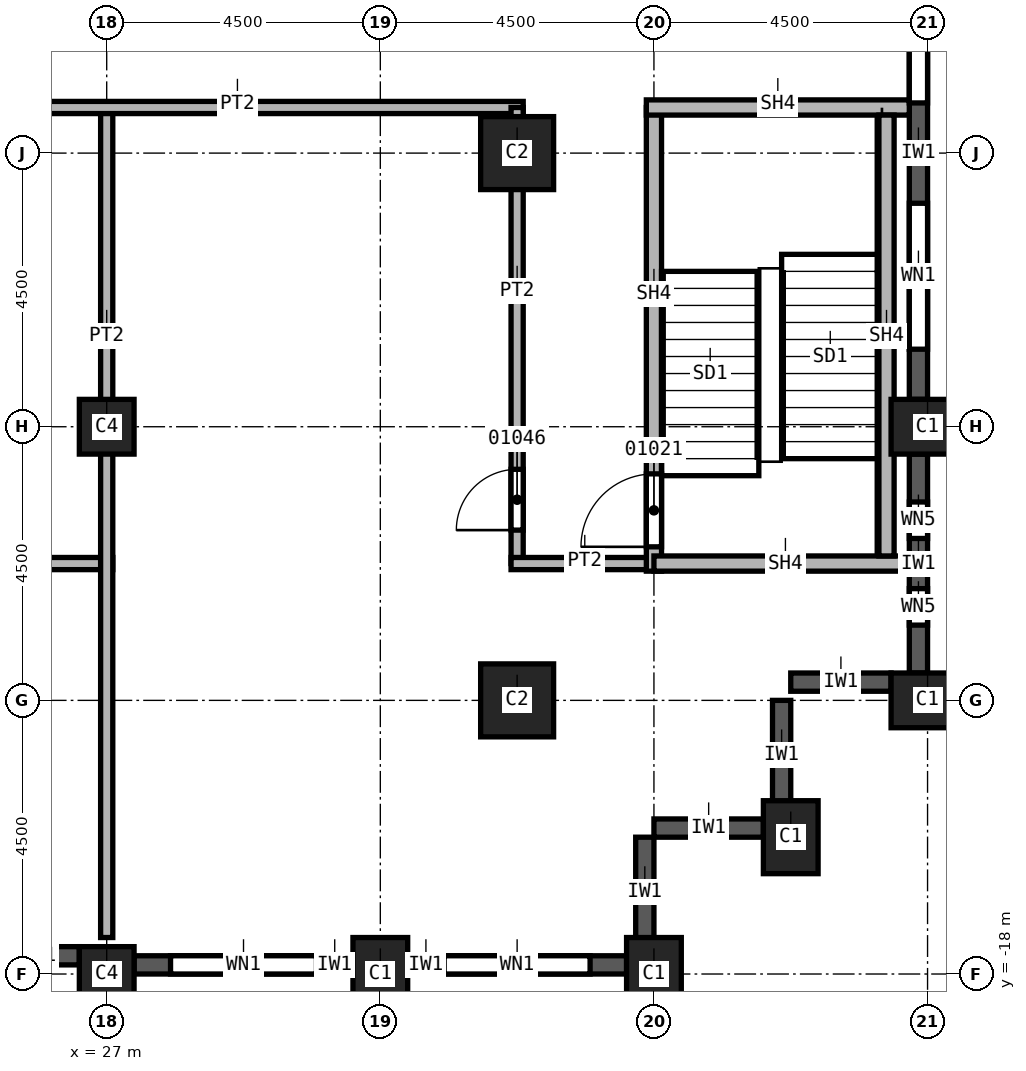
"""IFC4 building model, lengths in metres.
Left out: names, types, materials, properties, quantities, classifications, styles, units other than length and angle.
Written with IfcOpenShell. Run it as: python <this file> out.ifc"""

import sys

from ifc_helpers import new_model, si_unit, direction, frame, frame_2d, origin, origin_2d, place, context, subcontext, project, spatial, rectangle, extrude, element, fill, save


model = new_model("IFC4")
c1 = context("Model", 3, precision=1e-05, world=origin(), true_north=direction((0.0, 1.0)))
c2 = subcontext(c1, "Body", "Model", "MODEL_VIEW")
j1 = project(units=[si_unit("LENGTHUNIT", "METRE"), si_unit("PLANEANGLEUNIT", "RADIAN")], contexts=[c1])
p1 = place(None, origin())
s1 = spatial("IfcSite", under=j1, at=p1, CompositionType="ELEMENT")
p2 = place(p1, origin())
s2 = spatial("IfcBuilding", under=s1, at=p2, CompositionType="ELEMENT")
p3 = place(p2, frame((0.0, 0.0, 68.0)))
s3 = spatial("IfcBuildingStorey", under=s2, at=p3, CompositionType="ELEMENT", Elevation=68.0)
for number, where, z_axis, x_axis in (
    (1, (40.5, -9.0, 0.0), (0.0, 0.0, 1.0), (0.0, 1.0, 0.0)),
    (2, (40.5, -13.5, 0.0), (0.0, 0.0, 1.0), (0.0, 1.0, 0.0)),
    (3, (38.25, -15.75, 0.0), (0.0, 0.0, 1.0), (1.0, 0.0, 0.0)),
    (4, (31.5, -18.0, 0.0), (0.0, 0.0, 1.0), (1.0, 0.0, 0.0)),
    (5, (36.0, -18.0, 0.0), (0.0, 0.0, 1.0), (1.0, 0.0, 0.0)),
):
    element("IfcColumn", number, at=place(p3, frame(where, z_axis=z_axis, x_axis=x_axis)), inside=s3, PredefinedType="COLUMN", context=c2, shape_type="SweptSolid", body=[
        extrude(rectangle(XDim=0.9, YDim=1.2, at=origin_2d()), origin(), (0.0, 0.0, 1.0), 3.7),
    ])
for number, where, z_axis, x_axis in (
    (6, (33.75, -4.5, 0.0), (0.0, 0.0, 1.0), (1.0, 0.0, 0.0)),
    (7, (33.75, -13.5, 0.0), (0.0, 0.0, 1.0), (1.0, 0.0, 0.0)),
):
    element("IfcColumn", number, at=place(p3, frame(where, z_axis=z_axis, x_axis=x_axis)), inside=s3, PredefinedType="COLUMN", context=c2, shape_type="SweptSolid", body=[
        extrude(rectangle(XDim=1.2, YDim=1.2, at=origin_2d()), origin(), (0.0, 0.0, 1.0), 3.7),
    ])
for number, where, z_axis, x_axis in (
    (8, (27.0, -9.0, 0.0), (0.0, 0.0, 1.0), (1.0, 0.0, 0.0)),
    (9, (27.0, -18.0, 0.0), (0.0, 0.0, 1.0), (1.0, 0.0, 0.0)),
):
    element("IfcColumn", number, at=place(p3, frame(where, z_axis=z_axis, x_axis=x_axis)), inside=s3, PredefinedType="COLUMN", context=c2, shape_type="SweptSolid", body=[
        extrude(rectangle(XDim=0.9, YDim=0.9, at=origin_2d()), origin(), (0.0, 0.0, 1.0), 3.7),
    ])
for number, where, z_axis, x_axis in (
    (10, (35.85, -17.55, 0.0), (0.0, 0.0, 1.0), (0.0, 1.0, 0.0)),
    (11, (37.8, -15.6, 0.0), (0.0, 0.0, 1.0), (-1.0, 0.0, 0.0)),
    (12, (38.1, -15.3, 0.0), (0.0, 0.0, 1.0), (0.0, 1.0, 0.0)),
):
    element("IfcWall", number, at=place(p3, frame(where, z_axis=z_axis, x_axis=x_axis)), inside=s3, PredefinedType="SOLIDWALL", context=c2, shape_type="SweptSolid", body=[
        extrude(rectangle(XDim=1.8, YDim=0.3, at=frame_2d((0.9, 0.0))), origin(), (0.0, 0.0, 1.0), 3.1),
    ])
p4 = place(p3, frame((39.9, -13.2, 0.0), z_axis=(0.0, 0.0, 1.0), x_axis=(-1.0, 0.0, 0.0)))
e13 = element("IfcWall", 13, at=p4, inside=s3, PredefinedType="SOLIDWALL", context=c2, shape_type="SweptSolid", body=[
    extrude(rectangle(XDim=1.65, YDim=0.3, at=frame_2d((0.825, 0.0))), origin(), (0.0, 0.0, 1.0), 3.1),
])
p5 = place(p3, frame((25.2, -17.7, 0.0), z_axis=(0.0, 0.0, 1.0), x_axis=(1.0, 0.0, 0.0)))
e14 = element("IfcWall", 14, at=p5, inside=s3, PredefinedType="SOLIDWALL", context=c2, shape_type="SweptSolid", body=[
    extrude(rectangle(XDim=1.35, YDim=0.3, at=frame_2d((0.675, 0.0))), origin(), (0.0, 0.0, 1.0), 3.1),
])
p6 = place(p3, frame((27.45, -17.85, 0.0), z_axis=(0.0, 0.0, 1.0), x_axis=(1.0, 0.0, 0.0)))
e15 = element("IfcWall", 15, at=p6, inside=s3, PredefinedType="SOLIDWALL", context=c2, shape_type="SweptSolid", body=[
    extrude(rectangle(XDim=3.6, YDim=0.3, at=frame_2d((1.8, 0.0))), origin(), (0.0, 0.0, 1.0), 3.1),
])
p7 = place(p6, frame((0.6, 0.0, 0.8)))
e16 = element("IfcOpeningElement", 16, at=p7, cuts=e15, PredefinedType="OPENING", context=c2, shape_type="SweptSolid", body=[
    extrude(rectangle(XDim=2.4, YDim=1.95, at=frame_2d((1.2, 0.975))), frame((0.0, 0.15, 0.0), z_axis=(0.0, -1.0, 0.0), x_axis=(1.0, 0.0, 0.0)), (0.0, 0.0, 1.0), 0.3),
])
p8 = place(p3, frame((31.95, -17.85, 0.0), z_axis=(0.0, 0.0, 1.0), x_axis=(1.0, 0.0, 0.0)))
e17 = element("IfcWall", 17, at=p8, inside=s3, PredefinedType="SOLIDWALL", context=c2, shape_type="SweptSolid", body=[
    extrude(rectangle(XDim=3.6, YDim=0.3, at=frame_2d((1.8, 0.0))), origin(), (0.0, 0.0, 1.0), 3.1),
])
p9 = place(p8, frame((0.6, 0.0, 0.8)))
e18 = element("IfcOpeningElement", 18, at=p9, cuts=e17, PredefinedType="OPENING", context=c2, shape_type="SweptSolid", body=[
    extrude(rectangle(XDim=2.4, YDim=1.95, at=frame_2d((1.2, 0.975))), frame((0.0, 0.15, 0.0), z_axis=(0.0, -1.0, 0.0), x_axis=(1.0, 0.0, 0.0)), (0.0, 0.0, 1.0), 0.3),
])
p10 = place(p3, frame((40.35, -13.05, 0.0), z_axis=(0.0, 0.0, 1.0), x_axis=(0.0, 1.0, 0.0)))
e19 = element("IfcWall", 19, at=p10, inside=s3, PredefinedType="SOLIDWALL", context=c2, shape_type="SweptSolid", body=[
    extrude(rectangle(XDim=3.6, YDim=0.3, at=frame_2d((1.8, 0.0))), origin(), (0.0, 0.0, 1.0), 3.1),
])
p11 = place(p10, frame((0.788, 0.0, 0.8)))
e20 = element("IfcOpeningElement", 20, at=p11, cuts=e19, PredefinedType="OPENING", context=c2, shape_type="SweptSolid", body=[
    extrude(rectangle(XDim=0.6, YDim=1.95, at=frame_2d((0.3, 0.975))), frame((0.0, 0.15, 0.0), z_axis=(0.0, -1.0, 0.0), x_axis=(1.0, 0.0, 0.0)), (0.0, 0.0, 1.0), 0.3),
])
p12 = place(p10, frame((2.212, 0.0, 0.8)))
e21 = element("IfcOpeningElement", 21, at=p12, cuts=e19, PredefinedType="OPENING", context=c2, shape_type="SweptSolid", body=[
    extrude(rectangle(XDim=0.6, YDim=1.95, at=frame_2d((0.3, 0.975))), frame((0.0, 0.15, 0.0), z_axis=(0.0, -1.0, 0.0), x_axis=(1.0, 0.0, 0.0)), (0.0, 0.0, 1.0), 0.3),
])
p13 = place(p3, frame((40.35, -8.55, 0.0), z_axis=(0.0, 0.0, 1.0), x_axis=(0.0, 1.0, 0.0)))
e22 = element("IfcWall", 22, at=p13, inside=s3, PredefinedType="SOLIDWALL", context=c2, shape_type="SweptSolid", body=[
    extrude(rectangle(XDim=8.1, YDim=0.3, at=frame_2d((4.05, 0.0))), origin(), (0.0, 0.0, 1.0), 3.1),
])
p14 = place(p13, frame((0.825, 0.0, 0.8)))
e23 = element("IfcOpeningElement", 23, at=p14, cuts=e22, PredefinedType="OPENING", context=c2, shape_type="SweptSolid", body=[
    extrude(rectangle(XDim=2.4, YDim=1.95, at=frame_2d((1.2, 0.975))), frame((0.0, 0.15, 0.0), z_axis=(0.0, -1.0, 0.0), x_axis=(1.0, 0.0, 0.0)), (0.0, 0.0, 1.0), 0.3),
])
p15 = place(p13, frame((4.875, 0.0, 0.8)))
e24 = element("IfcOpeningElement", 24, at=p15, cuts=e22, PredefinedType="OPENING", context=c2, shape_type="SweptSolid", body=[
    extrude(rectangle(XDim=2.4, YDim=1.95, at=frame_2d((1.2, 0.975))), frame((0.0, 0.15, 0.0), z_axis=(0.0, -1.0, 0.0), x_axis=(1.0, 0.0, 0.0)), (0.0, 0.0, 1.0), 0.3),
])
p16 = place(p3, frame((15.4, -11.25, 0.0), z_axis=(0.0, 0.0, 1.0), x_axis=(1.0, 0.0, 0.0)))
e25 = element("IfcWall", 25, at=p16, inside=s3, PredefinedType="PARTITIONING", context=c2, shape_type="SweptSolid", body=[
    extrude(rectangle(XDim=11.7, YDim=0.2, at=frame_2d((5.85, 0.0))), origin(), (0.0, 0.0, 1.0), 3.7),
])
p17 = place(p3, frame((27.0, -3.75, 0.0), z_axis=(0.0, 0.0, 1.0), x_axis=(0.0, -1.0, 0.0)))
e26 = element("IfcWall", 26, at=p17, inside=s3, PredefinedType="PARTITIONING", context=c2, shape_type="SweptSolid", body=[
    extrude(rectangle(XDim=13.65, YDim=0.2, at=frame_2d((6.825, 0.0))), origin(), (0.0, 0.0, 1.0), 3.7),
])
p18 = place(p3, frame((33.85, -3.75, 0.0), z_axis=(0.0, 0.0, 1.0), x_axis=(-1.0, 0.0, 0.0)))
e27 = element("IfcWall", 27, at=p18, inside=s3, PredefinedType="PARTITIONING", context=c2, shape_type="SweptSolid", body=[
    extrude(rectangle(XDim=18.45, YDim=0.2, at=frame_2d((9.225, 0.0))), origin(), (0.0, 0.0, 1.0), 3.7),
])
p19 = place(p18, frame((9.4, 0.0, 0.0)))
e28 = element("IfcOpeningElement", 28, at=p19, cuts=e27, PredefinedType="OPENING", context=c2, shape_type="SweptSolid", body=[
    extrude(rectangle(XDim=1.0, YDim=2.1, at=frame_2d((0.5, 1.05))), frame((0.0, 0.1, 0.0), z_axis=(0.0, -1.0, 0.0), x_axis=(1.0, 0.0, 0.0)), (0.0, 0.0, 1.0), 0.2),
])
p20 = place(p3, frame((33.75, -11.25, 0.0), z_axis=(0.0, 0.0, 1.0), x_axis=(0.0, 1.0, 0.0)))
e29 = element("IfcWall", 29, at=p20, inside=s3, PredefinedType="PARTITIONING", context=c2, shape_type="SweptSolid", body=[
    extrude(rectangle(XDim=7.5, YDim=0.2, at=frame_2d((3.75, 0.0))), origin(), (0.0, 0.0, 1.0), 3.7),
])
p21 = place(p20, frame((0.55, 0.0, 0.0)))
e30 = element("IfcOpeningElement", 30, at=p21, cuts=e29, PredefinedType="OPENING", context=c2, shape_type="SweptSolid", body=[
    extrude(rectangle(XDim=1.0, YDim=2.1, at=frame_2d((0.5, 1.05))), frame((0.0, 0.1, 0.0), z_axis=(0.0, -1.0, 0.0), x_axis=(1.0, 0.0, 0.0)), (0.0, 0.0, 1.0), 0.2),
])
p22 = place(p3, frame((36.0, -11.25, 0.0), z_axis=(0.0, 0.0, 1.0), x_axis=(-1.0, 0.0, 0.0)))
e31 = element("IfcWall", 31, at=p22, inside=s3, PredefinedType="PARTITIONING", context=c2, shape_type="SweptSolid", body=[
    extrude(rectangle(XDim=2.35, YDim=0.2, at=frame_2d((1.175, 0.0))), origin(), (0.0, 0.0, 1.0), 3.7),
])
p23 = place(p3, frame((36.0, -11.375, 0.0), z_axis=(0.0, 0.0, 1.0), x_axis=(0.0, 1.0, 0.0)))
e32 = element("IfcWall", 32, at=p23, inside=s3, PredefinedType="SOLIDWALL", context=c2, shape_type="SweptSolid", body=[
    extrude(rectangle(XDim=7.625, YDim=0.25, at=frame_2d((3.812, 0.0))), origin(), (0.0, 0.0, 1.0), 3.7),
])
p24 = place(p23, frame((0.4, 0.0, 0.0)))
e33 = element("IfcOpeningElement", 33, at=p24, cuts=e32, PredefinedType="OPENING", context=c2, shape_type="SweptSolid", body=[
    extrude(rectangle(XDim=1.2, YDim=2.1, at=frame_2d((0.6, 1.05))), frame((0.0, 0.125, 0.0), z_axis=(0.0, -1.0, 0.0), x_axis=(1.0, 0.0, 0.0)), (0.0, 0.0, 1.0), 0.25),
])
p25 = place(p3, frame((40.2, -11.25, 0.0), z_axis=(0.0, 0.0, 1.0), x_axis=(-1.0, 0.0, 0.0)))
e34 = element("IfcWall", 34, at=p25, inside=s3, PredefinedType="SOLIDWALL", context=c2, shape_type="SweptSolid", body=[
    extrude(rectangle(XDim=4.2, YDim=0.25, at=frame_2d((2.1, 0.0))), origin(), (0.0, 0.0, 1.0), 3.7),
])
p26 = place(p3, frame((40.2, -3.75, 0.0), z_axis=(0.0, 0.0, 1.0), x_axis=(-1.0, 0.0, 0.0)))
e35 = element("IfcWall", 35, at=p26, inside=s3, PredefinedType="SOLIDWALL", context=c2, shape_type="SweptSolid", body=[
    extrude(rectangle(XDim=4.325, YDim=0.25, at=frame_2d((2.163, 0.0))), origin(), (0.0, 0.0, 1.0), 3.7),
])
p27 = place(p3, frame((39.825, -11.125, 0.0), z_axis=(0.0, 0.0, 1.0), x_axis=(0.0, 1.0, 0.0)))
e36 = element("IfcWall", 36, at=p27, inside=s3, PredefinedType="SOLIDWALL", context=c2, shape_type="SweptSolid", body=[
    extrude(rectangle(XDim=7.25, YDim=0.25, at=frame_2d((3.625, 0.0))), origin(), (0.0, 0.0, 1.0), 3.7),
])
p28 = place(p7, origin())
e37 = element("IfcWindow", 37, at=p28, inside=s3, PartitioningType="SINGLE_PANEL", PredefinedType="WINDOW", context=c2, shape_type="SweptSolid", body=[
    extrude(rectangle(XDim=2.4, YDim=1.95, at=frame_2d((1.2, 0.975))), frame((0.0, 0.03, 0.0), z_axis=(0.0, -1.0, 0.0), x_axis=(1.0, 0.0, 0.0)), (0.0, 0.0, 1.0), 0.06),
])
fill(e16, e37)
p29 = place(p9, origin())
e38 = element("IfcWindow", 38, at=p29, inside=s3, PartitioningType="SINGLE_PANEL", PredefinedType="WINDOW", context=c2, shape_type="SweptSolid", body=[
    extrude(rectangle(XDim=2.4, YDim=1.95, at=frame_2d((1.2, 0.975))), frame((0.0, 0.03, 0.0), z_axis=(0.0, -1.0, 0.0), x_axis=(1.0, 0.0, 0.0)), (0.0, 0.0, 1.0), 0.06),
])
fill(e18, e38)
p30 = place(p14, origin())
e39 = element("IfcWindow", 39, at=p30, inside=s3, PartitioningType="SINGLE_PANEL", PredefinedType="WINDOW", context=c2, shape_type="SweptSolid", body=[
    extrude(rectangle(XDim=2.4, YDim=1.95, at=frame_2d((1.2, 0.975))), frame((0.0, 0.03, 0.0), z_axis=(0.0, -1.0, 0.0), x_axis=(1.0, 0.0, 0.0)), (0.0, 0.0, 1.0), 0.06),
])
fill(e23, e39)
p31 = place(p15, origin())
e40 = element("IfcWindow", 40, at=p31, inside=s3, PartitioningType="SINGLE_PANEL", PredefinedType="WINDOW", context=c2, shape_type="SweptSolid", body=[
    extrude(rectangle(XDim=2.4, YDim=1.95, at=frame_2d((1.2, 0.975))), frame((0.0, 0.03, 0.0), z_axis=(0.0, -1.0, 0.0), x_axis=(1.0, 0.0, 0.0)), (0.0, 0.0, 1.0), 0.06),
])
fill(e24, e40)
p32 = place(p24, origin())
e41 = element("IfcDoor", 41, at=p32, inside=s3, OperationType="SINGLE_SWING_RIGHT", PredefinedType="DOOR", context=c2, shape_type="SweptSolid", body=[
    extrude(rectangle(XDim=1.2, YDim=2.1, at=frame_2d((0.6, 1.05))), frame((0.0, 0.025, 0.0), z_axis=(0.0, -1.0, 0.0), x_axis=(1.0, 0.0, 0.0)), (0.0, 0.0, 1.0), 0.05),
])
fill(e33, e41)
p33 = place(p21, origin())
e42 = element("IfcDoor", 42, at=p33, inside=s3, OperationType="SINGLE_SWING_LEFT", PredefinedType="DOOR", context=c2, shape_type="SweptSolid", body=[
    extrude(rectangle(XDim=1.0, YDim=2.1, at=frame_2d((0.5, 1.05))), frame((0.0, 0.025, 0.0), z_axis=(0.0, -1.0, 0.0), x_axis=(1.0, 0.0, 0.0)), (0.0, 0.0, 1.0), 0.05),
])
fill(e30, e42)
p34 = place(p11, origin())
e43 = element("IfcWindow", 43, at=p34, inside=s3, PartitioningType="SINGLE_PANEL", PredefinedType="WINDOW", context=c2, shape_type="SweptSolid", body=[
    extrude(rectangle(XDim=0.6, YDim=1.95, at=frame_2d((0.3, 0.975))), frame((0.0, 0.03, 0.0), z_axis=(0.0, -1.0, 0.0), x_axis=(1.0, 0.0, 0.0)), (0.0, 0.0, 1.0), 0.06),
])
fill(e20, e43)
p35 = place(p12, origin())
e44 = element("IfcWindow", 44, at=p35, inside=s3, PartitioningType="SINGLE_PANEL", PredefinedType="WINDOW", context=c2, shape_type="SweptSolid", body=[
    extrude(rectangle(XDim=0.6, YDim=1.95, at=frame_2d((0.3, 0.975))), frame((0.0, 0.03, 0.0), z_axis=(0.0, -1.0, 0.0), x_axis=(1.0, 0.0, 0.0)), (0.0, 0.0, 1.0), 0.06),
])
fill(e21, e44)
save(model, sys.argv[1])
